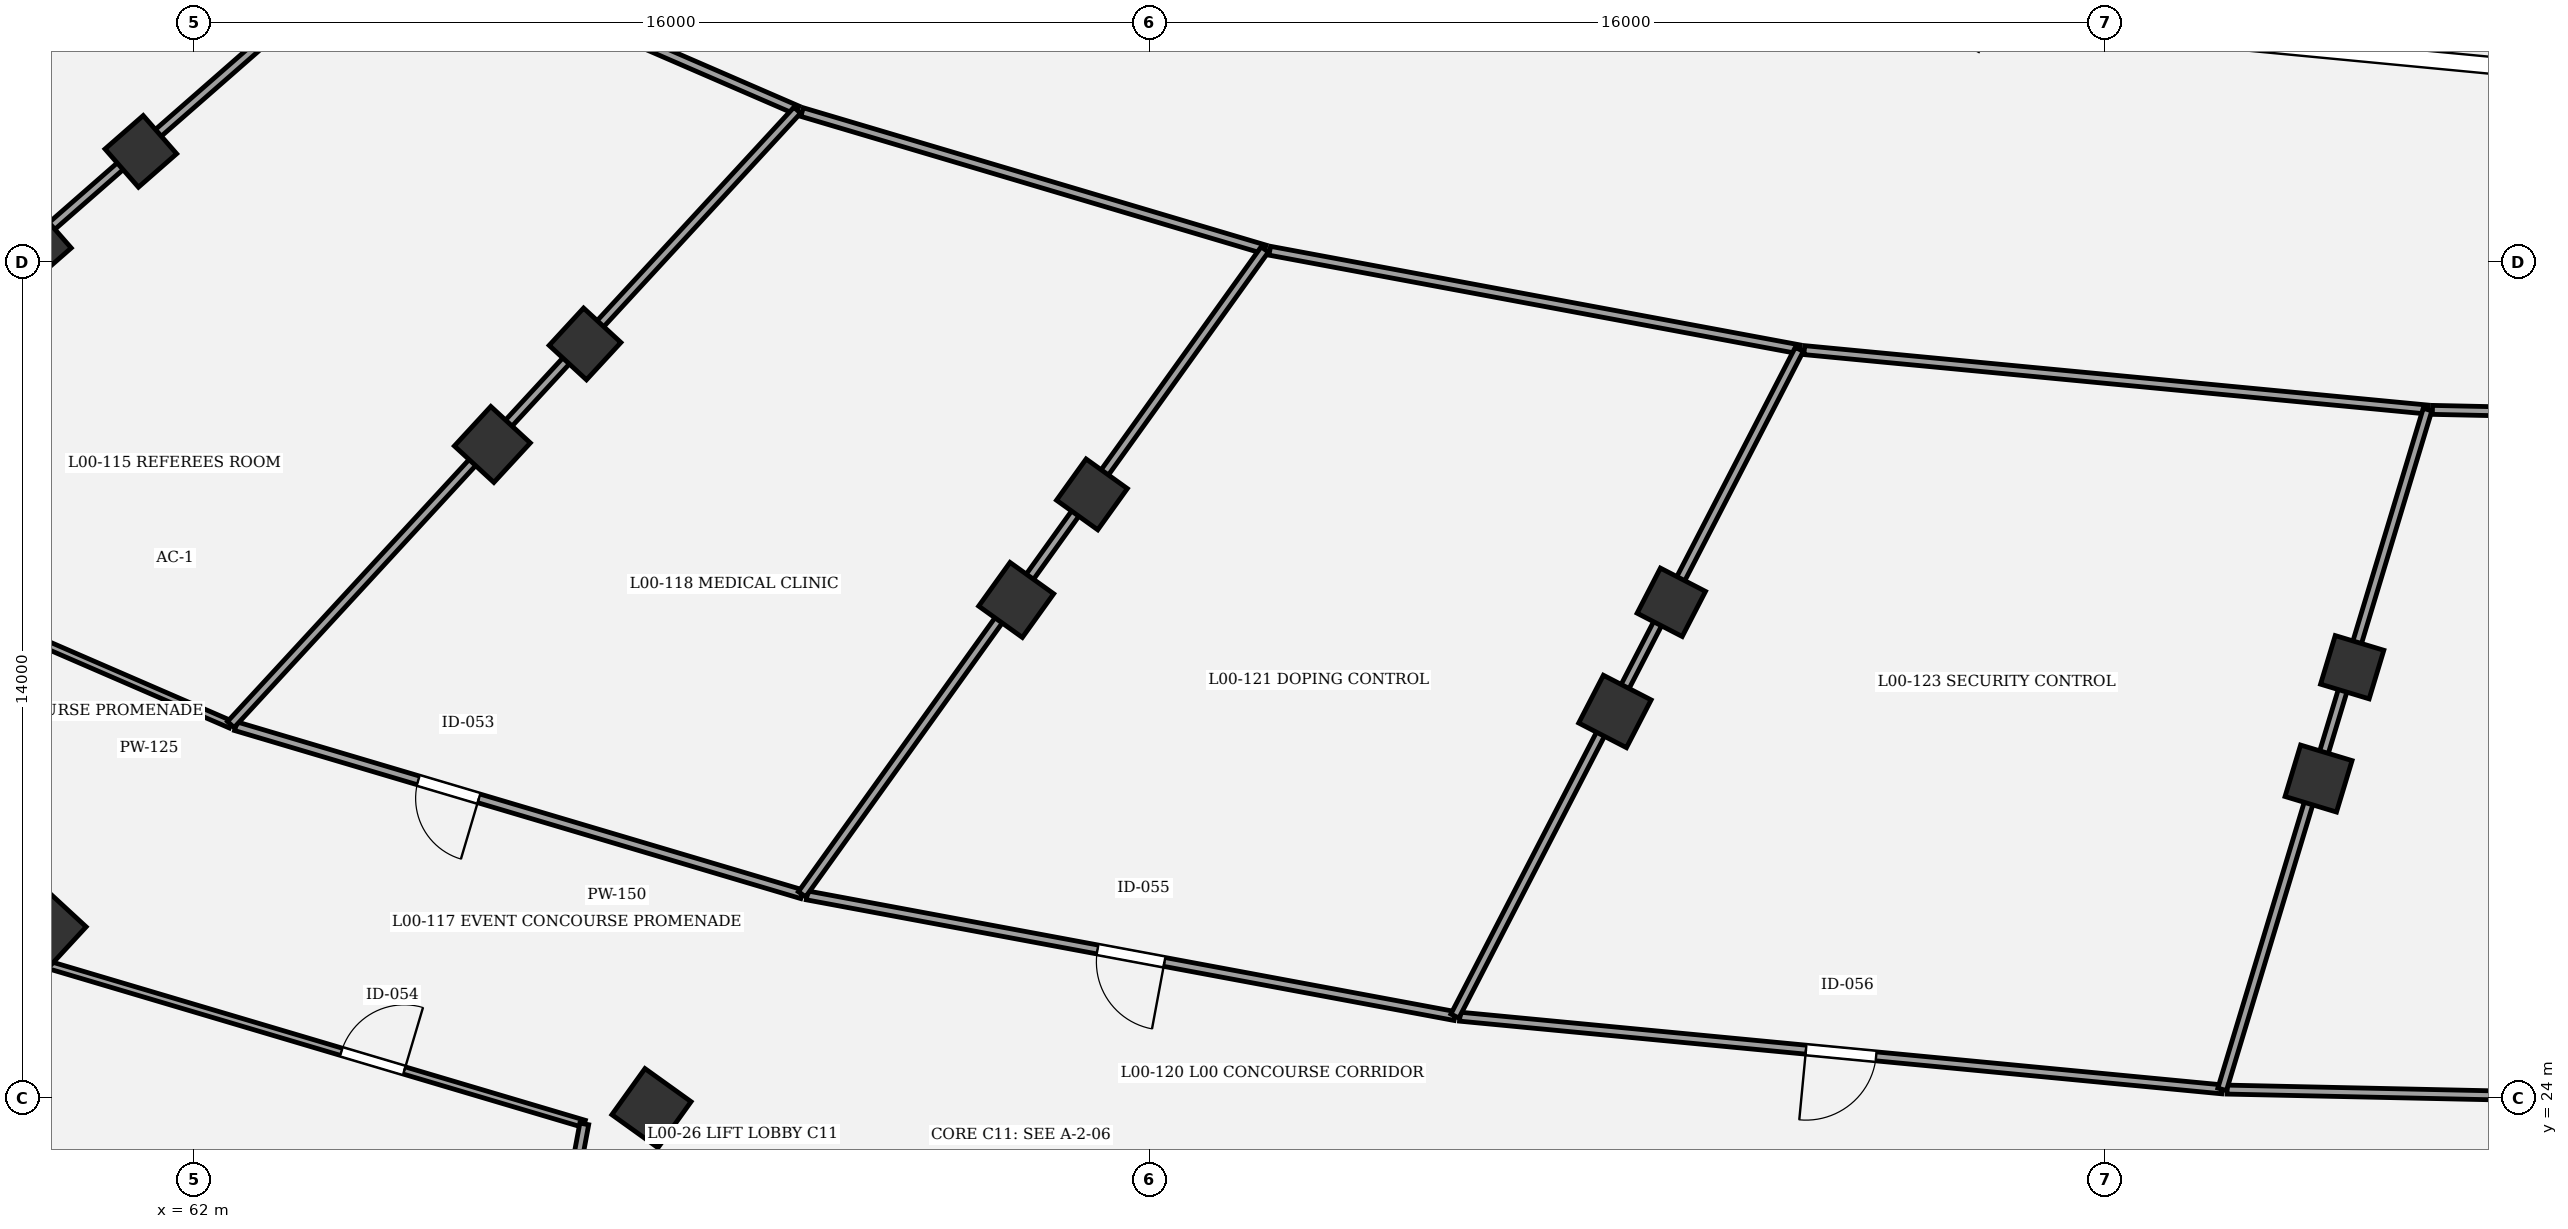
"""IFC4 building model, lengths in metres.
Left out: names, types, materials, properties, quantities, classifications, styles, units other than length and angle.
Written with IfcOpenShell. Run it as: python <this file> out.ifc"""

import sys

from ifc_helpers import new_model, si_unit, direction, frame, frame_2d, origin, origin_2d, place, context, subcontext, project, spatial, rectangle, extrude, element, fill, save


model = new_model("IFC4")
c1 = context("Model", 3, precision=1e-05, world=origin(), true_north=direction((0.0, 1.0)))
c2 = subcontext(c1, "Body", "Model", "MODEL_VIEW")
j1 = project(units=[si_unit("LENGTHUNIT", "METRE"), si_unit("PLANEANGLEUNIT", "RADIAN")], contexts=[c1])
p1 = place(None, origin())
s1 = spatial("IfcSite", under=j1, at=p1, CompositionType="ELEMENT")
p2 = place(p1, origin())
s2 = spatial("IfcBuilding", under=s1, at=p2, CompositionType="ELEMENT")
p3 = place(p2, origin())
s3 = spatial("IfcBuildingStorey", under=s2, at=p3, CompositionType="ELEMENT", Elevation=0.0)
p4 = place(p3, frame((61.111, 39.846, 0.0), z_axis=(0.0, 0.0, 1.0), x_axis=(-0.752529860433, -0.658558128912, 0.0)))
e1 = element("IfcColumn", 1, at=p4, inside=s3, PredefinedType="COLUMN", context=c2, shape_type="SweptSolid", body=[
    extrude(rectangle(XDim=0.85, YDim=0.85, at=origin_2d()), origin(), (0.0, 0.0, 1.0), 5.4),
])
p5 = place(p3, frame((59.31, 38.27, 0.0), z_axis=(0.0, 0.0, 1.0), x_axis=(-0.752529860433, -0.658558128912, 0.0)))
e2 = element("IfcColumn", 2, at=p5, inside=s3, PredefinedType="COLUMN", context=c2, shape_type="SweptSolid", body=[
    extrude(rectangle(XDim=0.9, YDim=0.9, at=origin_2d()), origin(), (0.0, 0.0, 1.0), 5.4),
])
p6 = place(p3, frame((68.55, 36.621, 0.0), z_axis=(0.0, 0.0, 1.0), x_axis=(-0.677903094969, -0.735151272753, 0.0)))
e3 = element("IfcColumn", 3, at=p6, inside=s3, PredefinedType="COLUMN", context=c2, shape_type="SweptSolid", body=[
    extrude(rectangle(XDim=0.85, YDim=0.85, at=origin_2d()), origin(), (0.0, 0.0, 1.0), 5.4),
])
p7 = place(p3, frame((66.997, 34.938, 0.0), z_axis=(0.0, 0.0, 1.0), x_axis=(-0.677903094969, -0.735151272753, 0.0)))
e4 = element("IfcColumn", 4, at=p7, inside=s3, PredefinedType="COLUMN", context=c2, shape_type="SweptSolid", body=[
    extrude(rectangle(XDim=0.9, YDim=0.9, at=origin_2d()), origin(), (0.0, 0.0, 1.0), 5.4),
])
p8 = place(p3, frame((59.524, 26.832, 0.0), z_axis=(0.0, 0.0, 1.0), x_axis=(-0.677903094969, -0.735151272753, 0.0)))
e5 = element("IfcColumn", 5, at=p8, inside=s3, PredefinedType="COLUMN", context=c2, shape_type="SweptSolid", body=[
    extrude(rectangle(XDim=0.95, YDim=0.95, at=origin_2d()), origin(), (0.0, 0.0, 1.0), 5.4),
])
p9 = place(p3, frame((77.038, 34.101, 0.0), z_axis=(0.0, 0.0, 1.0), x_axis=(-0.582974127943, -0.812490717577, 0.0)))
e6 = element("IfcColumn", 6, at=p9, inside=s3, PredefinedType="COLUMN", context=c2, shape_type="SweptSolid", body=[
    extrude(rectangle(XDim=0.85, YDim=0.85, at=origin_2d()), origin(), (0.0, 0.0, 1.0), 5.4),
])
p10 = place(p3, frame((75.77, 32.333, 0.0), z_axis=(0.0, 0.0, 1.0), x_axis=(-0.582974127943, -0.812490717577, 0.0)))
e7 = element("IfcColumn", 7, at=p10, inside=s3, PredefinedType="COLUMN", context=c2, shape_type="SweptSolid", body=[
    extrude(rectangle(XDim=0.9, YDim=0.9, at=origin_2d()), origin(), (0.0, 0.0, 1.0), 5.4),
])
p11 = place(p3, frame((69.662, 23.823, 0.0), z_axis=(0.0, 0.0, 1.0), x_axis=(-0.582974127943, -0.812490717577, 0.0)))
e8 = element("IfcColumn", 8, at=p11, inside=s3, PredefinedType="COLUMN", context=c2, shape_type="SweptSolid", body=[
    extrude(rectangle(XDim=0.95, YDim=0.95, at=origin_2d()), origin(), (0.0, 0.0, 1.0), 5.4),
])
p12 = place(p3, frame((86.741, 32.294, 0.0), z_axis=(0.0, 0.0, 1.0), x_axis=(-0.458959712465, -0.888457079624, 0.0)))
e9 = element("IfcColumn", 9, at=p12, inside=s3, PredefinedType="COLUMN", context=c2, shape_type="SweptSolid", body=[
    extrude(rectangle(XDim=0.85, YDim=0.85, at=origin_2d()), origin(), (0.0, 0.0, 1.0), 5.4),
])
p13 = place(p3, frame((85.796, 30.466, 0.0), z_axis=(0.0, 0.0, 1.0), x_axis=(-0.458959712465, -0.888457079624, 0.0)))
e10 = element("IfcColumn", 10, at=p13, inside=s3, PredefinedType="COLUMN", context=c2, shape_type="SweptSolid", body=[
    extrude(rectangle(XDim=0.9, YDim=0.9, at=origin_2d()), origin(), (0.0, 0.0, 1.0), 5.4),
])
p14 = place(p3, frame((98.143, 31.207, 0.0), z_axis=(0.0, 0.0, 1.0), x_axis=(-0.289198876314, -0.957269037387, 0.0)))
e11 = element("IfcColumn", 11, at=p14, inside=s3, PredefinedType="COLUMN", context=c2, shape_type="SweptSolid", body=[
    extrude(rectangle(XDim=0.85, YDim=0.85, at=origin_2d()), origin(), (0.0, 0.0, 1.0), 5.4),
])
p15 = place(p3, frame((97.58, 29.343, 0.0), z_axis=(0.0, 0.0, 1.0), x_axis=(-0.289198876314, -0.957269037387, 0.0)))
e12 = element("IfcColumn", 12, at=p15, inside=s3, PredefinedType="COLUMN", context=c2, shape_type="SweptSolid", body=[
    extrude(rectangle(XDim=0.9, YDim=0.9, at=origin_2d()), origin(), (0.0, 0.0, 1.0), 5.4),
])
p16 = place(p3, frame((62.618, 30.247, 0.0), z_axis=(0.0, 0.0, 1.0), x_axis=(-0.917494590455, 0.397748257677, 0.0)))
e13 = element("IfcWall", 13, at=p16, inside=s3, PredefinedType="PARTITIONING", context=c2, shape_type="SweptSolid", body=[
    extrude(rectangle(XDim=9.049, YDim=0.125, at=frame_2d((4.525, 0.0))), origin(), (0.0, 0.0, 1.0), 4.15),
])
p17 = place(p16, frame((6.263, 0.0, 0.0)))
e14 = element("IfcOpeningElement", 14, at=p17, cuts=e13, PredefinedType="OPENING", context=c2, shape_type="SweptSolid", body=[
    extrude(rectangle(XDim=0.98, YDim=2.2, at=frame_2d((0.49, 1.1))), frame((0.0, 0.073, 0.0), z_axis=(0.0, -1.0, 0.0), x_axis=(1.0, 0.0, 0.0)), (0.0, 0.0, 1.0), 0.145),
])
p18 = place(p3, frame((72.183, 27.404, 0.0), z_axis=(0.0, 0.0, 1.0), x_axis=(-0.958655809656, 0.284568161629, 0.0)))
e15 = element("IfcWall", 15, at=p18, inside=s3, PredefinedType="PARTITIONING", context=c2, shape_type="SweptSolid", body=[
    extrude(rectangle(XDim=9.891, YDim=0.15, at=frame_2d((4.946, 0.0))), origin(), (0.0, 0.0, 1.0), 4.15),
])
p19 = place(p18, frame((5.644, 0.0, 0.0)))
e16 = element("IfcOpeningElement", 16, at=p19, cuts=e15, PredefinedType="OPENING", context=c2, shape_type="SweptSolid", body=[
    extrude(rectangle(XDim=1.06, YDim=2.2, at=frame_2d((0.53, 1.1))), frame((0.0, 0.085, 0.0), z_axis=(0.0, -1.0, 0.0), x_axis=(1.0, 0.0, 0.0)), (0.0, 0.0, 1.0), 0.17),
])
p20 = place(p3, frame((59.134, 26.35, 0.0), z_axis=(0.0, 0.0, 1.0), x_axis=(0.958661401763, -0.284549322211, 0.0)))
e17 = element("IfcWall", 17, at=p20, inside=s3, PredefinedType="PARTITIONING", context=c2, shape_type="SweptSolid", body=[
    extrude(rectangle(XDim=9.809, YDim=0.125, at=frame_2d((4.904, 0.0))), origin(), (0.0, 0.0, 1.0), 4.15),
])
p21 = place(p20, frame((5.564, 0.0, 0.0)))
e18 = element("IfcOpeningElement", 18, at=p21, cuts=e17, PredefinedType="OPENING", context=c2, shape_type="SweptSolid", body=[
    extrude(rectangle(XDim=1.1, YDim=2.2, at=frame_2d((0.55, 1.1))), frame((0.0, 0.073, 0.0), z_axis=(0.0, -1.0, 0.0), x_axis=(1.0, 0.0, 0.0)), (0.0, 0.0, 1.0), 0.145),
])
p22 = place(p3, frame((83.116, 25.365, 0.0), z_axis=(0.0, 0.0, 1.0), x_axis=(-0.983097372707, 0.183083466695, 0.0)))
e19 = element("IfcWall", 19, at=p22, inside=s3, PredefinedType="PARTITIONING", context=c2, shape_type="SweptSolid", body=[
    extrude(rectangle(XDim=11.035, YDim=0.15, at=frame_2d((5.517, 0.0))), origin(), (0.0, 0.0, 1.0), 4.15),
])
p23 = place(p22, frame((4.947, 0.0, 0.0)))
e20 = element("IfcOpeningElement", 20, at=p23, cuts=e19, PredefinedType="OPENING", context=c2, shape_type="SweptSolid", body=[
    extrude(rectangle(XDim=1.14, YDim=2.2, at=frame_2d((0.57, 1.1))), frame((0.0, 0.085, 0.0), z_axis=(0.0, -1.0, 0.0), x_axis=(1.0, 0.0, 0.0)), (0.0, 0.0, 1.0), 0.17),
])
p24 = place(p3, frame((95.965, 24.138, 0.0), z_axis=(0.0, 0.0, 1.0), x_axis=(-0.995485111947, 0.094917816515, 0.0)))
e21 = element("IfcWall", 21, at=p24, inside=s3, PredefinedType="PARTITIONING", context=c2, shape_type="SweptSolid", body=[
    extrude(rectangle(XDim=12.822, YDim=0.15, at=frame_2d((6.411, 0.0))), origin(), (0.0, 0.0, 1.0), 4.15),
])
p25 = place(p24, frame((5.821, 0.0, 0.0)))
e22 = element("IfcOpeningElement", 22, at=p25, cuts=e21, PredefinedType="OPENING", context=c2, shape_type="SweptSolid", body=[
    extrude(rectangle(XDim=1.18, YDim=2.2, at=frame_2d((0.59, 1.1))), frame((0.0, 0.085, 0.0), z_axis=(0.0, -1.0, 0.0), x_axis=(1.0, 0.0, 0.0)), (0.0, 0.0, 1.0), 0.17),
])
p26 = place(p3, frame((114.96, 23.726, 0.0), z_axis=(0.0, 0.0, 1.0), x_axis=(-0.999768266483, 0.021527037261, 0.0)))
e23 = element("IfcWall", 23, at=p26, inside=s3, PredefinedType="PARTITIONING", context=c2, shape_type="SweptSolid", body=[
    extrude(rectangle(XDim=18.917, YDim=0.15, at=frame_2d((9.458, 0.0))), origin(), (0.0, 0.0, 1.0), 4.15),
])
p27 = place(p26, frame((8.829, 0.0, 0.0)))
e24 = element("IfcOpeningElement", 24, at=p27, cuts=e23, PredefinedType="OPENING", context=c2, shape_type="SweptSolid", body=[
    extrude(rectangle(XDim=1.26, YDim=2.2, at=frame_2d((0.63, 1.1))), frame((0.0, 0.085, 0.0), z_axis=(0.0, -1.0, 0.0), x_axis=(1.0, 0.0, 0.0)), (0.0, 0.0, 1.0), 0.17),
])
p28 = place(p3, frame((65.245, 43.517, 0.0), z_axis=(0.0, 0.0, 1.0), x_axis=(-0.75255911769, -0.658524695346, 0.0)))
e25 = element("IfcWall", 25, at=p28, inside=s3, PredefinedType="PARTITIONING", context=c2, shape_type="SweptSolid", body=[
    extrude(rectangle(XDim=14.627, YDim=0.15, at=frame_2d((7.314, 0.0))), origin(), (0.0, 0.0, 1.0), 4.15),
])
p29 = place(p3, frame((65.32, 43.476, 0.0), z_axis=(0.0, 0.0, 1.0), x_axis=(0.917502611666, -0.397729754463, 0.0)))
e26 = element("IfcWall", 26, at=p29, inside=s3, PredefinedType="PARTITIONING", context=c2, shape_type="SweptSolid", body=[
    extrude(rectangle(XDim=7.394, YDim=0.15, at=frame_2d((3.697, 0.0))), origin(), (0.0, 0.0, 1.0), 4.15),
])
p30 = place(p3, frame((72.104, 40.535, 0.0), z_axis=(0.0, 0.0, 1.0), x_axis=(-0.677851738249, -0.735198626871, 0.0)))
e27 = element("IfcWall", 27, at=p30, inside=s3, PredefinedType="PARTITIONING", context=c2, shape_type="SweptSolid", body=[
    extrude(rectangle(XDim=13.994, YDim=0.15, at=frame_2d((6.997, 0.0))), origin(), (0.0, 0.0, 1.0), 4.15),
])
p31 = place(p3, frame((72.184, 40.504, 0.0), z_axis=(0.0, 0.0, 1.0), x_axis=(0.958664246127, -0.284539739226, 0.0)))
e28 = element("IfcWall", 28, at=p31, inside=s3, PredefinedType="PARTITIONING", context=c2, shape_type="SweptSolid", body=[
    extrude(rectangle(XDim=8.083, YDim=0.15, at=frame_2d((4.042, 0.0))), origin(), (0.0, 0.0, 1.0), 4.15),
])
p32 = place(p3, frame((79.933, 38.204, 0.0), z_axis=(0.0, 0.0, 1.0), x_axis=(-0.583015953896, -0.812460705205, 0.0)))
e29 = element("IfcWall", 29, at=p32, inside=s3, PredefinedType="PARTITIONING", context=c2, shape_type="SweptSolid", body=[
    extrude(rectangle(XDim=13.292, YDim=0.15, at=frame_2d((6.646, 0.0))), origin(), (0.0, 0.0, 1.0), 4.15),
])
p33 = place(p3, frame((68.537, 23.559, 0.0), z_axis=(0.0, 0.0, 1.0), x_axis=(-0.183185863857, -0.983078297636, 0.0)))
e30 = element("IfcWall", 30, at=p33, inside=s3, PredefinedType="PARTITIONING", context=c2, shape_type="SweptSolid", body=[
    extrude(rectangle(XDim=1.698, YDim=0.15, at=frame_2d((0.849, 0.0))), origin(), (0.0, 0.0, 1.0), 4.15),
])
p34 = place(p3, frame((80.016, 38.182, 0.0), z_axis=(0.0, 0.0, 1.0), x_axis=(0.983094830755, -0.183097115603, 0.0)))
e31 = element("IfcWall", 31, at=p34, inside=s3, PredefinedType="PARTITIONING", context=c2, shape_type="SweptSolid", body=[
    extrude(rectangle(XDim=9.021, YDim=0.15, at=frame_2d((4.51, 0.0))), origin(), (0.0, 0.0, 1.0), 4.15),
])
p35 = place(p3, frame((88.884, 36.53, 0.0), z_axis=(0.0, 0.0, 1.0), x_axis=(-0.45894823356, -0.88846300931, 0.0)))
e32 = element("IfcWall", 32, at=p35, inside=s3, PredefinedType="PARTITIONING", context=c2, shape_type="SweptSolid", body=[
    extrude(rectangle(XDim=12.566, YDim=0.15, at=frame_2d((6.283, 0.0))), origin(), (0.0, 0.0, 1.0), 4.15),
])
p36 = place(p3, frame((88.967, 36.517, 0.0), z_axis=(0.0, 0.0, 1.0), x_axis=(0.99548363917, -0.094933261529, 0.0)))
e33 = element("IfcWall", 33, at=p36, inside=s3, PredefinedType="PARTITIONING", context=c2, shape_type="SweptSolid", body=[
    extrude(rectangle(XDim=10.485, YDim=0.15, at=frame_2d((5.242, 0.0))), origin(), (0.0, 0.0, 1.0), 4.15),
])
p37 = place(p3, frame((99.405, 35.522, 0.0), z_axis=(0.0, 0.0, 1.0), x_axis=(-0.289230709122, -0.957259419855, 0.0)))
e34 = element("IfcWall", 34, at=p37, inside=s3, PredefinedType="PARTITIONING", context=c2, shape_type="SweptSolid", body=[
    extrude(rectangle(XDim=11.893, YDim=0.15, at=frame_2d((5.946, 0.0))), origin(), (0.0, 0.0, 1.0), 4.15),
])
p38 = place(p3, frame((99.487, 35.517, 0.0), z_axis=(0.0, 0.0, 1.0), x_axis=(0.999768149952, -0.021532448558, 0.0)))
e35 = element("IfcWall", 35, at=p38, inside=s3, PredefinedType="PARTITIONING", context=c2, shape_type="SweptSolid", body=[
    extrude(rectangle(XDim=15.477, YDim=0.15, at=frame_2d((7.738, 0.0))), origin(), (0.0, 0.0, 1.0), 4.15),
])
p39 = place(p19, origin())
e36 = element("IfcDoor", 36, at=p39, inside=s3, OperationType="SINGLE_SWING_LEFT", PredefinedType="DOOR", context=c2, shape_type="SweptSolid", body=[
    extrude(rectangle(XDim=1.06, YDim=2.2, at=frame_2d((0.53, 1.1))), frame((0.0, 0.025, 0.0), z_axis=(0.0, -1.0, 0.0), x_axis=(1.0, 0.0, 0.0)), (0.0, 0.0, 1.0), 0.05),
])
fill(e16, e36)
p40 = place(p21, origin())
e37 = element("IfcDoor", 37, at=p40, inside=s3, OperationType="SINGLE_SWING_RIGHT", PredefinedType="DOOR", context=c2, shape_type="SweptSolid", body=[
    extrude(rectangle(XDim=1.1, YDim=2.2, at=frame_2d((0.55, 1.1))), frame((0.0, 0.025, 0.0), z_axis=(0.0, -1.0, 0.0), x_axis=(1.0, 0.0, 0.0)), (0.0, 0.0, 1.0), 0.05),
])
fill(e18, e37)
p41 = place(p23, origin())
e38 = element("IfcDoor", 38, at=p41, inside=s3, OperationType="SINGLE_SWING_LEFT", PredefinedType="DOOR", context=c2, shape_type="SweptSolid", body=[
    extrude(rectangle(XDim=1.14, YDim=2.2, at=frame_2d((0.57, 1.1))), frame((0.0, 0.025, 0.0), z_axis=(0.0, -1.0, 0.0), x_axis=(1.0, 0.0, 0.0)), (0.0, 0.0, 1.0), 0.05),
])
fill(e20, e38)
p42 = place(p25, origin())
e39 = element("IfcDoor", 39, at=p42, inside=s3, OperationType="SINGLE_SWING_RIGHT", PredefinedType="DOOR", context=c2, shape_type="SweptSolid", body=[
    extrude(rectangle(XDim=1.18, YDim=2.2, at=frame_2d((0.59, 1.1))), frame((0.0, 0.025, 0.0), z_axis=(0.0, -1.0, 0.0), x_axis=(1.0, 0.0, 0.0)), (0.0, 0.0, 1.0), 0.05),
])
fill(e22, e39)
save(model, sys.argv[1])
